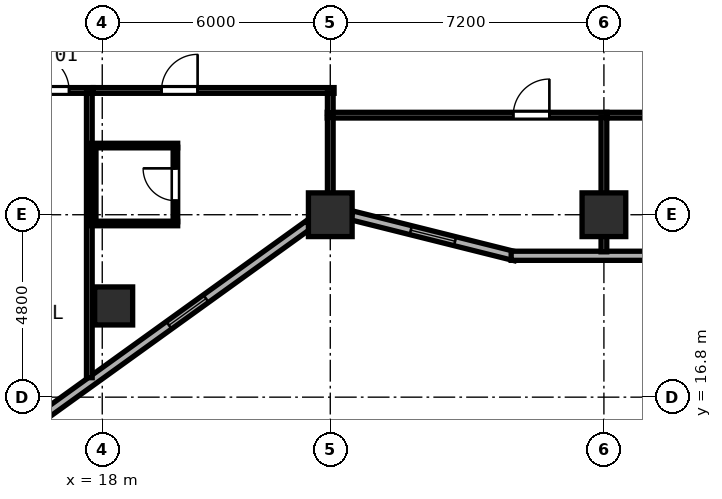
"""IFC4 building model, lengths in metres.
Left out: names, types, materials, properties, quantities, classifications, styles, units other than length and angle.
Written with IfcOpenShell. Run it as: python <this file> out.ifc"""

import sys

from ifc_helpers import new_model, si_unit, direction, frame, frame_2d, origin, origin_2d, place, context, subcontext, project, spatial, rectangle, hollow_rectangle, extrude, element, fill, save


model = new_model("IFC4")
c1 = context("Model", 3, precision=1e-05, world=origin(), true_north=direction((0.0, 1.0)))
c2 = subcontext(c1, "Body", "Model", "MODEL_VIEW")
j1 = project(units=[si_unit("LENGTHUNIT", "METRE"), si_unit("PLANEANGLEUNIT", "RADIAN")], contexts=[c1])
p1 = place(None, origin())
s1 = spatial("IfcSite", under=j1, at=p1, CompositionType="ELEMENT")
p2 = place(p1, origin())
s2 = spatial("IfcBuilding", under=s1, at=p2, CompositionType="ELEMENT")
p3 = place(p2, frame((0.0, 0.0, 70.4)))
s3 = spatial("IfcBuildingStorey", under=s2, at=p3, CompositionType="ELEMENT", Elevation=70.4)
for number, where, z_axis, x_axis in (
    (1, (24.0, 21.6, 0.0), (0.0, 0.0, 1.0), (1.0, 0.0, 0.0)),
    (2, (31.2, 21.6, 0.0), (0.0, 0.0, 1.0), (1.0, 0.0, 0.0)),
):
    element("IfcColumn", number, at=place(p3, frame(where, z_axis=z_axis, x_axis=x_axis)), inside=s3, PredefinedType="COLUMN", context=c2, shape_type="SweptSolid", body=[
        extrude(hollow_rectangle(XDim=1.15, YDim=1.15, WallThickness=0.042, at=origin_2d()), origin(), (0.0, 0.0, 1.0), 3.8),
    ])
p4 = place(p3, frame((18.3, 19.2, 0.0), z_axis=(0.0, 0.0, 1.0), x_axis=(1.0, 0.0, 0.0)))
e3 = element("IfcColumn", 3, at=p4, inside=s3, PredefinedType="COLUMN", context=c2, shape_type="SweptSolid", body=[
    extrude(hollow_rectangle(XDim=1.0, YDim=1.0, WallThickness=0.038, at=origin_2d()), origin(), (0.0, 0.0, 1.0), 3.8),
])
p5 = place(p3, frame((14.075, 14.602, 0.0), z_axis=(0.0, 0.0, 1.0), x_axis=(0.811543176492, 0.58429245476, 0.0)))
e4 = element("IfcWall", 4, at=p5, inside=s3, PredefinedType="SOLIDWALL", context=c2, shape_type="SweptSolid", body=[
    extrude(rectangle(XDim=11.531, YDim=0.24, at=frame_2d((5.765, 0.0))), origin(), (0.0, 0.0, 1.0), 3.097),
])
p6 = place(p5, frame((1.6, 0.0, 0.85)))
e5 = element("IfcOpeningElement", 5, at=p6, cuts=e4, PredefinedType="OPENING", context=c2, shape_type="SweptSolid", body=[
    extrude(rectangle(XDim=1.2, YDim=1.85, at=frame_2d((0.6, 0.925))), frame((0.0, 0.13, 0.0), z_axis=(0.0, -1.0, 0.0), x_axis=(1.0, 0.0, 0.0)), (0.0, 0.0, 1.0), 0.26),
])
p7 = place(p5, frame((7.0, 0.0, 0.85)))
e6 = element("IfcOpeningElement", 6, at=p7, cuts=e4, PredefinedType="OPENING", context=c2, shape_type="SweptSolid", body=[
    extrude(rectangle(XDim=1.2, YDim=1.85, at=frame_2d((0.6, 0.925))), frame((0.0, 0.13, 0.0), z_axis=(0.0, -1.0, 0.0), x_axis=(1.0, 0.0, 0.0)), (0.0, 0.0, 1.0), 0.26),
])
p8 = place(p3, frame((24.567, 21.582, 0.0), z_axis=(0.0, 0.0, 1.0), x_axis=(0.970148978127, -0.24250971164, 0.0)))
e7 = element("IfcWall", 7, at=p8, inside=s3, PredefinedType="SOLIDWALL", context=c2, shape_type="SweptSolid", body=[
    extrude(rectangle(XDim=4.434, YDim=0.24, at=frame_2d((2.217, 0.0))), origin(), (0.0, 0.0, 1.0), 3.097),
])
p9 = place(p8, frame((1.6, 0.0, 0.85)))
e8 = element("IfcOpeningElement", 8, at=p9, cuts=e7, PredefinedType="OPENING", context=c2, shape_type="SweptSolid", body=[
    extrude(rectangle(XDim=1.2, YDim=1.85, at=frame_2d((0.6, 0.925))), frame((0.0, 0.13, 0.0), z_axis=(0.0, -1.0, 0.0), x_axis=(1.0, 0.0, 0.0)), (0.0, 0.0, 1.0), 0.26),
])
p10 = place(p3, frame((28.76, 20.52, 0.0), z_axis=(0.0, 0.0, 1.0), x_axis=(1.0, 0.0, 0.0)))
e9 = element("IfcWall", 9, at=p10, inside=s3, PredefinedType="SOLIDWALL", context=c2, shape_type="SweptSolid", body=[
    extrude(rectangle(XDim=19.281, YDim=0.24, at=frame_2d((9.64, 0.0))), origin(), (0.0, 0.0, 1.0), 3.6),
])
p11 = place(p10, frame((15.64, 0.0, 0.0), z_axis=(0.0, 0.0, 1.0), x_axis=(-1.0, 0.0, 0.0)))
e10 = element("IfcOpeningElement", 10, at=p11, cuts=e9, PredefinedType="OPENING", context=c2, shape_type="SweptSolid", body=[
    extrude(rectangle(XDim=1.2, YDim=2.15, at=frame_2d((0.6, 1.075))), frame((0.0, 0.13, 0.0), z_axis=(0.0, -1.0, 0.0), x_axis=(1.0, 0.0, 0.0)), (0.0, 0.0, 1.0), 0.26),
])
p12 = place(p3, frame((23.92, 24.22, 0.0), z_axis=(0.0, 0.0, 1.0), x_axis=(1.0, 0.0, 0.0)))
e11 = element("IfcWall", 11, at=p12, inside=s3, PredefinedType="PARTITIONING", context=c2, shape_type="SweptSolid", body=[
    extrude(rectangle(XDim=7.36, YDim=0.15, at=frame_2d((3.68, 0.0))), origin(), (0.0, 0.0, 1.0), 3.6),
])
p13 = place(p12, frame((5.845, 0.0, 0.0), z_axis=(0.0, 0.0, 1.0), x_axis=(-1.0, 0.0, 0.0)))
e12 = element("IfcOpeningElement", 12, at=p13, cuts=e11, PredefinedType="OPENING", context=c2, shape_type="SweptSolid", body=[
    extrude(rectangle(XDim=0.95, YDim=2.12, at=frame_2d((0.475, 1.06))), frame((0.0, 0.085, 0.0), z_axis=(0.0, -1.0, 0.0), x_axis=(1.0, 0.0, 0.0)), (0.0, 0.0, 1.0), 0.17),
])
p14 = place(p3, frame((24.0, 21.819, 0.0), z_axis=(0.0, 0.0, 1.0), x_axis=(0.0, 1.0, 0.0)))
e13 = element("IfcWall", 13, at=p14, inside=s3, PredefinedType="PARTITIONING", context=c2, shape_type="SweptSolid", body=[
    extrude(rectangle(XDim=2.341, YDim=0.15, at=frame_2d((1.171, 0.0))), origin(), (0.0, 0.0, 1.0), 3.097),
])
p15 = place(p3, frame((31.2, 20.625, 0.0), z_axis=(0.0, 0.0, 1.0), x_axis=(0.0, 1.0, 0.0)))
e14 = element("IfcWall", 14, at=p15, inside=s3, PredefinedType="PARTITIONING", context=c2, shape_type="SweptSolid", body=[
    extrude(rectangle(XDim=3.535, YDim=0.15, at=frame_2d((1.768, 0.0))), origin(), (0.0, 0.0, 1.0), 2.985),
])
p16 = place(p3, frame((31.282, 24.22, 0.0), z_axis=(0.0, 0.0, 1.0), x_axis=(1.0, 0.0, 0.0)))
e15 = element("IfcWall", 15, at=p16, inside=s3, PredefinedType="PARTITIONING", context=c2, shape_type="SweptSolid", body=[
    extrude(rectangle(XDim=7.198, YDim=0.15, at=frame_2d((3.599, 0.0))), origin(), (0.0, 0.0, 1.0), 3.6),
])
p17 = place(p16, frame((3.913, 0.0, 0.0), z_axis=(0.0, 0.0, 1.0), x_axis=(-1.0, 0.0, 0.0)))
e16 = element("IfcOpeningElement", 16, at=p17, cuts=e15, PredefinedType="OPENING", context=c2, shape_type="SweptSolid", body=[
    extrude(rectangle(XDim=0.95, YDim=2.12, at=frame_2d((0.475, 1.06))), frame((0.0, 0.085, 0.0), z_axis=(0.0, -1.0, 0.0), x_axis=(1.0, 0.0, 0.0)), (0.0, 0.0, 1.0), 0.17),
])
p18 = place(p3, frame((11.7, 24.87, 0.0), z_axis=(0.0, 0.0, 1.0), x_axis=(1.0, 0.0, 0.0)))
e17 = element("IfcWall", 17, at=p18, inside=s3, PredefinedType="PARTITIONING", context=c2, shape_type="SweptSolid", body=[
    extrude(rectangle(XDim=6.06, YDim=0.15, at=frame_2d((3.03, 0.0))), origin(), (0.0, 0.0, 1.0), 3.185),
])
p19 = place(p18, frame((5.427, 0.0, 0.0), z_axis=(0.0, 0.0, 1.0), x_axis=(-1.0, 0.0, 0.0)))
e18 = element("IfcOpeningElement", 18, at=p19, cuts=e17, PredefinedType="OPENING", context=c2, shape_type="SweptSolid", body=[
    extrude(rectangle(XDim=0.95, YDim=2.18, at=frame_2d((0.475, 1.09))), frame((0.0, 0.085, 0.0), z_axis=(0.0, -1.0, 0.0), x_axis=(1.0, 0.0, 0.0)), (0.0, 0.0, 1.0), 0.17),
])
p20 = place(p3, frame((17.66, 17.312, 0.0), z_axis=(0.0, 0.0, 1.0), x_axis=(0.0, 1.0, 0.0)))
e19 = element("IfcWall", 19, at=p20, inside=s3, PredefinedType="PARTITIONING", context=c2, shape_type="SweptSolid", body=[
    extrude(rectangle(XDim=7.498, YDim=0.15, at=frame_2d((3.749, 0.0))), origin(), (0.0, 0.0, 1.0), 3.6),
])
p21 = place(p3, frame((17.762, 24.87, 0.0), z_axis=(0.0, 0.0, 1.0), x_axis=(1.0, 0.0, 0.0)))
e20 = element("IfcWall", 20, at=p21, inside=s3, PredefinedType="PARTITIONING", context=c2, shape_type="SweptSolid", body=[
    extrude(rectangle(XDim=6.338, YDim=0.15, at=frame_2d((3.169, 0.0))), origin(), (0.0, 0.0, 1.0), 3.185),
])
p22 = place(p21, frame((2.747, 0.0, 0.0), z_axis=(0.0, 0.0, 1.0), x_axis=(-1.0, 0.0, 0.0)))
e21 = element("IfcOpeningElement", 21, at=p22, cuts=e20, PredefinedType="OPENING", context=c2, shape_type="SweptSolid", body=[
    extrude(rectangle(XDim=0.95, YDim=2.18, at=frame_2d((0.475, 1.09))), frame((0.0, 0.085, 0.0), z_axis=(0.0, -1.0, 0.0), x_axis=(1.0, 0.0, 0.0)), (0.0, 0.0, 1.0), 0.17),
])
p23 = place(p3, frame((24.0, 24.28, 0.0), z_axis=(0.0, 0.0, 1.0), x_axis=(0.0, 1.0, 0.0)))
e22 = element("IfcWall", 22, at=p23, inside=s3, PredefinedType="PARTITIONING", context=c2, shape_type="SweptSolid", body=[
    extrude(rectangle(XDim=0.53, YDim=0.15, at=frame_2d((0.265, 0.0))), origin(), (0.0, 0.0, 1.0), 3.097),
])
for number, where, z_axis, x_axis in (
    (23, (17.72, 23.42, 0.0), (0.0, 0.0, 1.0), (1.0, 0.0, 0.0)),
    (24, (17.72, 21.37, 0.0), (0.0, 0.0, 1.0), (1.0, 0.0, 0.0)),
):
    element("IfcWall", number, at=place(p3, frame(where, z_axis=z_axis, x_axis=x_axis)), inside=s3, PredefinedType="PARTITIONING", context=c2, shape_type="SweptSolid", body=[
        extrude(rectangle(XDim=2.265, YDim=0.12, at=frame_2d((1.133, 0.0))), origin(), (0.0, 0.0, 1.0), 3.6),
    ])
p24 = place(p3, frame((17.775, 21.415, 0.0), z_axis=(0.0, 0.0, 1.0), x_axis=(0.0, 1.0, 0.0)))
e25 = element("IfcWall", 25, at=p24, inside=s3, PredefinedType="PARTITIONING", context=c2, shape_type="SweptSolid", body=[
    extrude(rectangle(XDim=1.96, YDim=0.12, at=frame_2d((0.98, 0.0))), origin(), (0.0, 0.0, 1.0), 3.6),
])
p25 = place(p3, frame((19.925, 21.415, 0.0), z_axis=(0.0, 0.0, 1.0), x_axis=(0.0, 1.0, 0.0)))
e26 = element("IfcWall", 26, at=p25, inside=s3, PredefinedType="PARTITIONING", context=c2, shape_type="SweptSolid", body=[
    extrude(rectangle(XDim=1.96, YDim=0.12, at=frame_2d((0.98, 0.0))), origin(), (0.0, 0.0, 1.0), 3.6),
])
p26 = place(p25, frame((0.555, 0.0, 0.0)))
e27 = element("IfcOpeningElement", 27, at=p26, cuts=e26, PredefinedType="OPENING", context=c2, shape_type="SweptSolid", body=[
    extrude(rectangle(XDim=0.85, YDim=2.1, at=frame_2d((0.425, 1.05))), frame((0.0, 0.07, 0.0), z_axis=(0.0, -1.0, 0.0), x_axis=(1.0, 0.0, 0.0)), (0.0, 0.0, 1.0), 0.14),
])
p27 = place(p7, origin())
e28 = element("IfcWindow", 28, at=p27, inside=s3, PartitioningType="SINGLE_PANEL", PredefinedType="WINDOW", context=c2, shape_type="SweptSolid", body=[
    extrude(rectangle(XDim=1.2, YDim=1.85, at=frame_2d((0.6, 0.925))), frame((0.0, 0.03, 0.0), z_axis=(0.0, -1.0, 0.0), x_axis=(1.0, 0.0, 0.0)), (0.0, 0.0, 1.0), 0.06),
])
fill(e6, e28)
p28 = place(p9, origin())
e29 = element("IfcWindow", 29, at=p28, inside=s3, PartitioningType="SINGLE_PANEL", PredefinedType="WINDOW", context=c2, shape_type="SweptSolid", body=[
    extrude(rectangle(XDim=1.2, YDim=1.85, at=frame_2d((0.6, 0.925))), frame((0.0, 0.03, 0.0), z_axis=(0.0, -1.0, 0.0), x_axis=(1.0, 0.0, 0.0)), (0.0, 0.0, 1.0), 0.06),
])
fill(e8, e29)
p29 = place(p13, origin())
e30 = element("IfcDoor", 30, at=p29, inside=s3, OperationType="SINGLE_SWING_LEFT", PredefinedType="DOOR", context=c2, shape_type="SweptSolid", body=[
    extrude(rectangle(XDim=0.95, YDim=2.12, at=frame_2d((0.475, 1.06))), frame((0.0, 0.025, 0.0), z_axis=(0.0, -1.0, 0.0), x_axis=(1.0, 0.0, 0.0)), (0.0, 0.0, 1.0), 0.05),
])
fill(e12, e30)
p30 = place(p19, origin())
e31 = element("IfcDoor", 31, at=p30, inside=s3, OperationType="SINGLE_SWING_RIGHT", PredefinedType="DOOR", context=c2, shape_type="SweptSolid", body=[
    extrude(rectangle(XDim=0.95, YDim=2.18, at=frame_2d((0.475, 1.09))), frame((0.0, 0.025, 0.0), z_axis=(0.0, -1.0, 0.0), x_axis=(1.0, 0.0, 0.0)), (0.0, 0.0, 1.0), 0.05),
])
fill(e18, e31)
p31 = place(p22, origin())
e32 = element("IfcDoor", 32, at=p31, inside=s3, OperationType="SINGLE_SWING_LEFT", PredefinedType="DOOR", context=c2, shape_type="SweptSolid", body=[
    extrude(rectangle(XDim=0.95, YDim=2.18, at=frame_2d((0.475, 1.09))), frame((0.0, 0.025, 0.0), z_axis=(0.0, -1.0, 0.0), x_axis=(1.0, 0.0, 0.0)), (0.0, 0.0, 1.0), 0.05),
])
fill(e21, e32)
p32 = place(p26, origin())
e33 = element("IfcDoor", 33, at=p32, inside=s3, OperationType="SINGLE_SWING_RIGHT", PredefinedType="DOOR", context=c2, shape_type="SweptSolid", body=[
    extrude(rectangle(XDim=0.85, YDim=2.1, at=frame_2d((0.425, 1.05))), frame((0.0, 0.025, 0.0), z_axis=(0.0, -1.0, 0.0), x_axis=(1.0, 0.0, 0.0)), (0.0, 0.0, 1.0), 0.05),
])
fill(e27, e33)
save(model, sys.argv[1])
